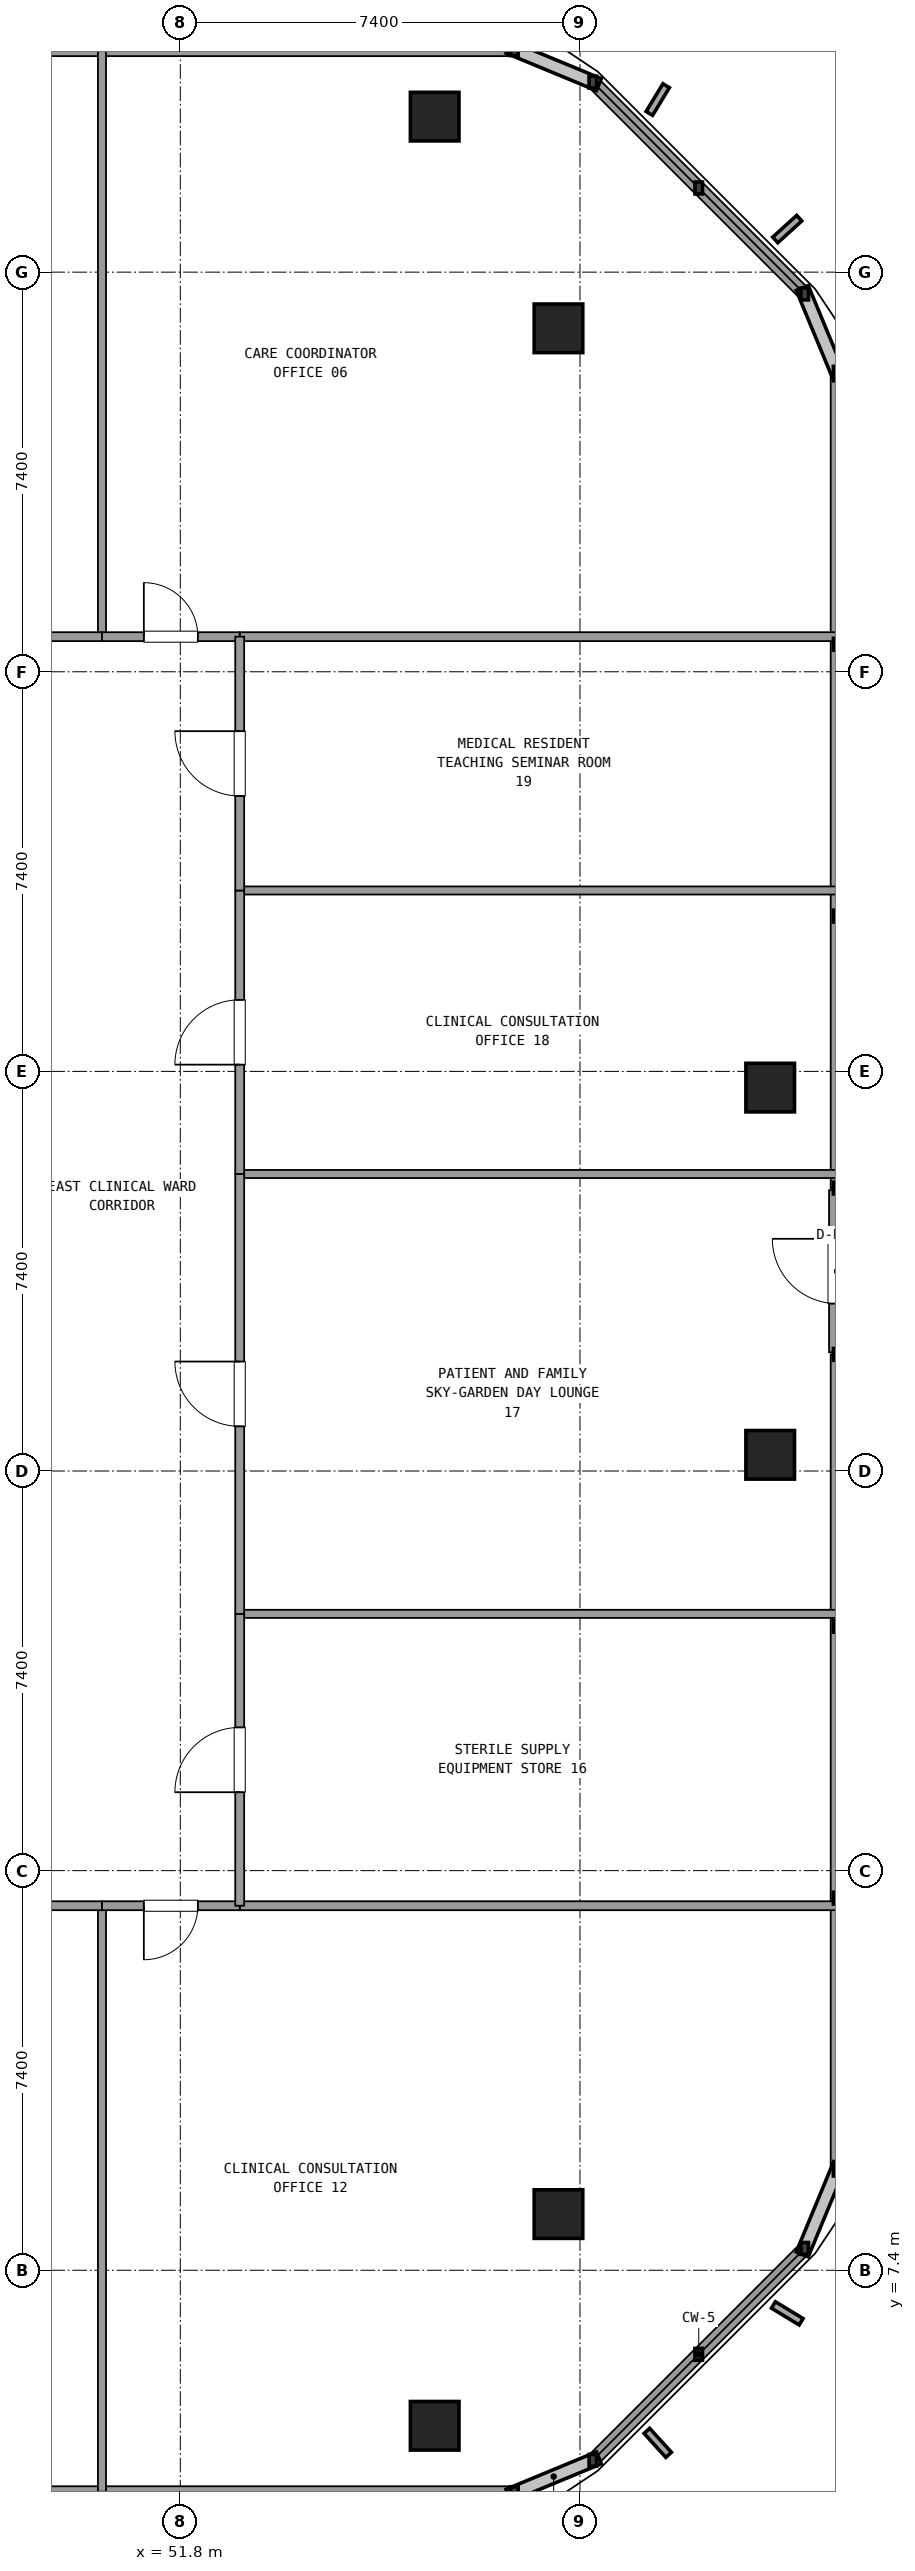
"""IFC4 building model, lengths in metres.
Left out: names, types, materials, properties, quantities, classifications, styles, units other than length and angle.
Written with IfcOpenShell. Run it as: python <this file> out.ifc"""

import sys

from ifc_helpers import new_model, si_unit, direction, frame, frame_2d, origin, origin_2d, place, context, subcontext, project, spatial, rectangle, extrude, element, fill, save


model = new_model("IFC4")
c1 = context("Model", 3, precision=1e-05, world=origin(), true_north=direction((0.0, 1.0)))
c2 = subcontext(c1, "Body", "Model", "MODEL_VIEW")
j1 = project(units=[si_unit("LENGTHUNIT", "METRE"), si_unit("PLANEANGLEUNIT", "RADIAN")], contexts=[c1])
p1 = place(None, origin())
s1 = spatial("IfcSite", under=j1, at=p1, CompositionType="ELEMENT")
p2 = place(p1, origin())
s2 = spatial("IfcBuilding", under=s1, at=p2, CompositionType="ELEMENT")
p3 = place(p2, frame((0.0, 0.0, 221.58)))
s3 = spatial("IfcBuildingStorey", under=s2, at=p3, CompositionType="ELEMENT", Elevation=221.58)
for number, where, z_axis, x_axis in (
    (1, (56.51, 4.52, 0.021), (0.0, 0.0, 1.0), (1.0, 0.0, 0.0)),
    (2, (58.802, 8.44, 0.021), (0.0, 0.0, 1.0), (1.0, 0.0, 0.0)),
    (3, (62.722, 22.5, 0.021), (0.0, 0.0, 1.0), (1.0, 0.0, 0.0)),
    (4, (62.722, 29.3, 0.021), (0.0, 0.0, 1.0), (1.0, 0.0, 0.0)),
    (5, (58.802, 43.36, 0.021), (0.0, 0.0, 1.0), (1.0, 0.0, 0.0)),
    (6, (56.51, 47.28, 0.021), (0.0, 0.0, 1.0), (1.0, 0.0, 0.0)),
):
    element("IfcColumn", number, at=place(p3, frame(where, z_axis=z_axis, x_axis=x_axis)), inside=s3, PredefinedType="COLUMN", context=c2, shape_type="SweptSolid", body=[
        extrude(rectangle(XDim=0.9, YDim=0.9, at=origin_2d()), origin(), (0.0, 0.0, 1.0), 3.579),
    ])
p4 = place(p3, frame((16.013, 3.28, 0.0), z_axis=(0.0, 0.0, 1.0), x_axis=(1.0, 0.0, 0.0)))
e7 = element("IfcWall", 7, at=p4, inside=s3, PredefinedType="SOLIDWALL", context=c2, shape_type="SweptSolid", body=[
    extrude(rectangle(XDim=41.974, YDim=0.24, at=frame_2d((20.987, 0.0))), origin(), (0.0, 0.0, 1.0), 0.85),
])
p5 = place(p3, frame((59.438, 3.881, 0.0), z_axis=(0.0, 0.0, 1.0), x_axis=(0.707128783731, 0.707084777957, 0.0)))
e8 = element("IfcWall", 8, at=p5, inside=s3, PredefinedType="SOLIDWALL", context=c2, shape_type="SweptSolid", body=[
    extrude(rectangle(XDim=5.548, YDim=0.24, at=frame_2d((2.774, 0.0))), origin(), (0.0, 0.0, 1.0), 0.85),
])
p6 = place(p3, frame((63.962, 24.4, 0.0), z_axis=(0.0, 0.0, 1.0), x_axis=(0.0, 1.0, 0.0)))
e9 = element("IfcWall", 9, at=p6, inside=s3, PredefinedType="SOLIDWALL", context=c2, shape_type="SweptSolid", body=[
    extrude(rectangle(XDim=3.0, YDim=0.3, at=frame_2d((1.5, 0.0))), origin(), (0.0, 0.0, 1.0), 2.69),
])
p7 = place(p6, frame((0.9, 0.0, 0.0)))
e10 = element("IfcOpeningElement", 10, at=p7, cuts=e9, PredefinedType="OPENING", context=c2, shape_type="SweptSolid", body=[
    extrude(rectangle(XDim=1.2, YDim=2.2, at=frame_2d((0.6, 1.1))), frame((0.0, 0.16, 0.0), z_axis=(0.0, -1.0, 0.0), x_axis=(1.0, 0.0, 0.0)), (0.0, 0.0, 1.0), 0.32),
])
p8 = place(p3, frame((63.962, 9.255, 0.0), z_axis=(0.0, 0.0, 1.0), x_axis=(0.0, 1.0, 0.0)))
e11 = element("IfcWall", 11, at=p8, inside=s3, PredefinedType="SOLIDWALL", context=c2, shape_type="SweptSolid", body=[
    extrude(rectangle(XDim=15.105, YDim=0.24, at=frame_2d((7.553, 0.0))), origin(), (0.0, 0.0, 1.0), 0.85),
])
p9 = place(p3, frame((63.962, 27.44, 0.0), z_axis=(0.0, 0.0, 1.0), x_axis=(0.0, 1.0, 0.0)))
e12 = element("IfcWall", 12, at=p9, inside=s3, PredefinedType="SOLIDWALL", context=c2, shape_type="SweptSolid", body=[
    extrude(rectangle(XDim=15.105, YDim=0.24, at=frame_2d((7.552, 0.0))), origin(), (0.0, 0.0, 1.0), 0.85),
])
p10 = place(p3, frame((63.361, 43.996, 0.0), z_axis=(0.0, 0.0, 1.0), x_axis=(-0.707128783731, 0.707084777957, 0.0)))
e13 = element("IfcWall", 13, at=p10, inside=s3, PredefinedType="SOLIDWALL", context=c2, shape_type="SweptSolid", body=[
    extrude(rectangle(XDim=5.548, YDim=0.24, at=frame_2d((2.774, 0.0))), origin(), (0.0, 0.0, 1.0), 0.85),
])
p11 = place(p3, frame((57.987, 48.52, 0.0), z_axis=(0.0, 0.0, 1.0), x_axis=(-1.0, 0.0, 0.0)))
e14 = element("IfcWall", 14, at=p11, inside=s3, PredefinedType="SOLIDWALL", context=c2, shape_type="SweptSolid", body=[
    extrude(rectangle(XDim=41.974, YDim=0.24, at=frame_2d((20.987, 0.0))), origin(), (0.0, 0.0, 1.0), 0.85),
])
for number, where, z_axis, x_axis in (
    (15, (52.9, 37.65, 0.0), (0.0, 0.0, 1.0), (1.0, 0.0, 0.0)),
    (16, (52.9, 14.15, 0.0), (0.0, 0.0, 1.0), (1.0, 0.0, 0.0)),
):
    element("IfcWall", number, at=place(p3, frame(where, z_axis=z_axis, x_axis=x_axis)), inside=s3, PredefinedType="PARTITIONING", context=c2, shape_type="SweptSolid", body=[
        extrude(rectangle(XDim=11.042, YDim=0.165, at=frame_2d((5.521, 0.0))), origin(), (0.0, 0.0, 1.0), 2.61),
    ])
p12 = place(p3, frame((50.35, 37.65, 0.0), z_axis=(0.0, 0.0, 1.0), x_axis=(0.0, 1.0, 0.0)))
e17 = element("IfcWall", 17, at=p12, inside=s3, PredefinedType="PARTITIONING", context=c2, shape_type="SweptSolid", body=[
    extrude(rectangle(XDim=10.85, YDim=0.15, at=frame_2d((5.425, 0.0))), origin(), (0.0, 0.0, 1.0), 2.61),
])
p13 = place(p3, frame((43.221, 37.65, 0.0), z_axis=(0.0, 0.0, 1.0), x_axis=(1.0, 0.0, 0.0)))
e18 = element("IfcWall", 18, at=p13, inside=s3, PredefinedType="PARTITIONING", context=c2, shape_type="SweptSolid", body=[
    extrude(rectangle(XDim=7.129, YDim=0.165, at=frame_2d((3.564, 0.0))), origin(), (0.0, 0.0, 1.0), 2.61),
])
p14 = place(p13, frame((2.965, 0.0, 0.0)))
e19 = element("IfcOpeningElement", 19, at=p14, cuts=e18, PredefinedType="OPENING", context=c2, shape_type="SweptSolid", body=[
    extrude(rectangle(XDim=1.2, YDim=2.15, at=frame_2d((0.6, 1.075))), frame((0.0, 0.093, 0.0), z_axis=(0.0, -1.0, 0.0), x_axis=(1.0, 0.0, 0.0)), (0.0, 0.0, 1.0), 0.185),
])
p15 = place(p3, frame((50.35, 37.65, 0.0), z_axis=(0.0, 0.0, 1.0), x_axis=(1.0, 0.0, 0.0)))
e20 = element("IfcWall", 20, at=p15, inside=s3, PredefinedType="PARTITIONING", context=c2, shape_type="SweptSolid", body=[
    extrude(rectangle(XDim=2.55, YDim=0.165, at=frame_2d((1.275, 0.0))), origin(), (0.0, 0.0, 1.0), 2.61),
])
p16 = place(p15, frame((0.775, 0.0, 0.0)))
e21 = element("IfcOpeningElement", 21, at=p16, cuts=e20, PredefinedType="OPENING", context=c2, shape_type="SweptSolid", body=[
    extrude(rectangle(XDim=1.0, YDim=2.15, at=frame_2d((0.5, 1.075))), frame((0.0, 0.093, 0.0), z_axis=(0.0, -1.0, 0.0), x_axis=(1.0, 0.0, 0.0)), (0.0, 0.0, 1.0), 0.185),
])
p17 = place(p3, frame((50.35, 14.15, 0.0), z_axis=(0.0, 0.0, 1.0), x_axis=(0.0, -1.0, 0.0)))
e22 = element("IfcWall", 22, at=p17, inside=s3, PredefinedType="PARTITIONING", context=c2, shape_type="SweptSolid", body=[
    extrude(rectangle(XDim=10.85, YDim=0.15, at=frame_2d((5.425, 0.0))), origin(), (0.0, 0.0, 1.0), 2.61),
])
p18 = place(p3, frame((43.221, 14.15, 0.0), z_axis=(0.0, 0.0, 1.0), x_axis=(1.0, 0.0, 0.0)))
e23 = element("IfcWall", 23, at=p18, inside=s3, PredefinedType="PARTITIONING", context=c2, shape_type="SweptSolid", body=[
    extrude(rectangle(XDim=7.129, YDim=0.165, at=frame_2d((3.564, 0.0))), origin(), (0.0, 0.0, 1.0), 2.61),
])
p19 = place(p18, frame((2.965, 0.0, 0.0)))
e24 = element("IfcOpeningElement", 24, at=p19, cuts=e23, PredefinedType="OPENING", context=c2, shape_type="SweptSolid", body=[
    extrude(rectangle(XDim=1.2, YDim=2.15, at=frame_2d((0.6, 1.075))), frame((0.0, 0.093, 0.0), z_axis=(0.0, -1.0, 0.0), x_axis=(1.0, 0.0, 0.0)), (0.0, 0.0, 1.0), 0.185),
])
p20 = place(p3, frame((50.35, 14.15, 0.0), z_axis=(0.0, 0.0, 1.0), x_axis=(1.0, 0.0, 0.0)))
e25 = element("IfcWall", 25, at=p20, inside=s3, PredefinedType="PARTITIONING", context=c2, shape_type="SweptSolid", body=[
    extrude(rectangle(XDim=2.55, YDim=0.165, at=frame_2d((1.275, 0.0))), origin(), (0.0, 0.0, 1.0), 2.61),
])
p21 = place(p20, frame((0.775, 0.0, 0.0)))
e26 = element("IfcOpeningElement", 26, at=p21, cuts=e25, PredefinedType="OPENING", context=c2, shape_type="SweptSolid", body=[
    extrude(rectangle(XDim=1.0, YDim=2.15, at=frame_2d((0.5, 1.075))), frame((0.0, 0.093, 0.0), z_axis=(0.0, -1.0, 0.0), x_axis=(1.0, 0.0, 0.0)), (0.0, 0.0, 1.0), 0.185),
])
p22 = place(p3, frame((52.9, 19.555, 0.0), z_axis=(0.0, 0.0, 1.0), x_axis=(1.0, 0.0, 0.0)))
e27 = element("IfcWall", 27, at=p22, inside=s3, PredefinedType="PARTITIONING", context=c2, shape_type="SweptSolid", body=[
    extrude(rectangle(XDim=11.042, YDim=0.15, at=frame_2d((5.521, 0.0))), origin(), (0.0, 0.0, 1.0), 2.61),
])
p23 = place(p3, frame((52.9, 14.15, 0.0), z_axis=(0.0, 0.0, 1.0), x_axis=(0.0, 1.0, 0.0)))
e28 = element("IfcWall", 28, at=p23, inside=s3, PredefinedType="PARTITIONING", context=c2, shape_type="SweptSolid", body=[
    extrude(rectangle(XDim=5.405, YDim=0.165, at=frame_2d((2.703, 0.0))), origin(), (0.0, 0.0, 1.0), 2.61),
])
p24 = place(p23, frame((2.102, 0.0, 0.0)))
e29 = element("IfcOpeningElement", 29, at=p24, cuts=e28, PredefinedType="OPENING", context=c2, shape_type="SweptSolid", body=[
    extrude(rectangle(XDim=1.2, YDim=2.15, at=frame_2d((0.6, 1.075))), frame((0.0, 0.093, 0.0), z_axis=(0.0, -1.0, 0.0), x_axis=(1.0, 0.0, 0.0)), (0.0, 0.0, 1.0), 0.185),
])
p25 = place(p3, frame((52.9, 27.7, 0.0), z_axis=(0.0, 0.0, 1.0), x_axis=(1.0, 0.0, 0.0)))
e30 = element("IfcWall", 30, at=p25, inside=s3, PredefinedType="PARTITIONING", context=c2, shape_type="SweptSolid", body=[
    extrude(rectangle(XDim=11.042, YDim=0.15, at=frame_2d((5.521, 0.0))), origin(), (0.0, 0.0, 1.0), 2.61),
])
p26 = place(p3, frame((52.9, 19.555, 0.0), z_axis=(0.0, 0.0, 1.0), x_axis=(0.0, 1.0, 0.0)))
e31 = element("IfcWall", 31, at=p26, inside=s3, PredefinedType="PARTITIONING", context=c2, shape_type="SweptSolid", body=[
    extrude(rectangle(XDim=8.145, YDim=0.165, at=frame_2d((4.073, 0.0))), origin(), (0.0, 0.0, 1.0), 2.61),
])
p27 = place(p26, frame((3.472, 0.0, 0.0)))
e32 = element("IfcOpeningElement", 32, at=p27, cuts=e31, PredefinedType="OPENING", context=c2, shape_type="SweptSolid", body=[
    extrude(rectangle(XDim=1.2, YDim=2.15, at=frame_2d((0.6, 1.075))), frame((0.0, 0.093, 0.0), z_axis=(0.0, -1.0, 0.0), x_axis=(1.0, 0.0, 0.0)), (0.0, 0.0, 1.0), 0.185),
])
p28 = place(p3, frame((52.9, 32.95, 0.0), z_axis=(0.0, 0.0, 1.0), x_axis=(1.0, 0.0, 0.0)))
e33 = element("IfcWall", 33, at=p28, inside=s3, PredefinedType="PARTITIONING", context=c2, shape_type="SweptSolid", body=[
    extrude(rectangle(XDim=11.042, YDim=0.15, at=frame_2d((5.521, 0.0))), origin(), (0.0, 0.0, 1.0), 2.61),
])
p29 = place(p3, frame((52.9, 27.7, 0.0), z_axis=(0.0, 0.0, 1.0), x_axis=(0.0, 1.0, 0.0)))
e34 = element("IfcWall", 34, at=p29, inside=s3, PredefinedType="PARTITIONING", context=c2, shape_type="SweptSolid", body=[
    extrude(rectangle(XDim=5.25, YDim=0.165, at=frame_2d((2.625, 0.0))), origin(), (0.0, 0.0, 1.0), 2.61),
])
p30 = place(p29, frame((2.025, 0.0, 0.0)))
e35 = element("IfcOpeningElement", 35, at=p30, cuts=e34, PredefinedType="OPENING", context=c2, shape_type="SweptSolid", body=[
    extrude(rectangle(XDim=1.2, YDim=2.15, at=frame_2d((0.6, 1.075))), frame((0.0, 0.093, 0.0), z_axis=(0.0, -1.0, 0.0), x_axis=(1.0, 0.0, 0.0)), (0.0, 0.0, 1.0), 0.185),
])
p31 = place(p3, frame((52.9, 32.95, 0.0), z_axis=(0.0, 0.0, 1.0), x_axis=(0.0, 1.0, 0.0)))
e36 = element("IfcWall", 36, at=p31, inside=s3, PredefinedType="PARTITIONING", context=c2, shape_type="SweptSolid", body=[
    extrude(rectangle(XDim=4.7, YDim=0.165, at=frame_2d((2.35, 0.0))), origin(), (0.0, 0.0, 1.0), 2.61),
])
p32 = place(p31, frame((1.75, 0.0, 0.0)))
e37 = element("IfcOpeningElement", 37, at=p32, cuts=e36, PredefinedType="OPENING", context=c2, shape_type="SweptSolid", body=[
    extrude(rectangle(XDim=1.2, YDim=2.15, at=frame_2d((0.6, 1.075))), frame((0.0, 0.093, 0.0), z_axis=(0.0, -1.0, 0.0), x_axis=(1.0, 0.0, 0.0)), (0.0, 0.0, 1.0), 0.185),
])
p33 = place(p16, origin())
e38 = element("IfcDoor", 38, at=p33, inside=s3, OperationType="SINGLE_SWING_LEFT", PredefinedType="DOOR", context=c2, shape_type="SweptSolid", body=[
    extrude(rectangle(XDim=1.0, YDim=2.15, at=frame_2d((0.5, 1.075))), frame((0.0, 0.025, 0.0), z_axis=(0.0, -1.0, 0.0), x_axis=(1.0, 0.0, 0.0)), (0.0, 0.0, 1.0), 0.05),
])
fill(e21, e38)
p34 = place(p21, frame((1.0, 0.0, 0.0), z_axis=(0.0, 0.0, 1.0), x_axis=(-1.0, 0.0, 0.0)))
e39 = element("IfcDoor", 39, at=p34, inside=s3, OperationType="SINGLE_SWING_LEFT", PredefinedType="DOOR", context=c2, shape_type="SweptSolid", body=[
    extrude(rectangle(XDim=1.0, YDim=2.15, at=frame_2d((0.5, 1.075))), frame((0.0, 0.025, 0.0), z_axis=(0.0, -1.0, 0.0), x_axis=(1.0, 0.0, 0.0)), (0.0, 0.0, 1.0), 0.05),
])
fill(e26, e39)
p35 = place(p24, origin())
e40 = element("IfcDoor", 40, at=p35, inside=s3, OperationType="SINGLE_SWING_LEFT", PredefinedType="DOOR", context=c2, shape_type="SweptSolid", body=[
    extrude(rectangle(XDim=1.2, YDim=2.15, at=frame_2d((0.6, 1.075))), frame((0.0, 0.025, 0.0), z_axis=(0.0, -1.0, 0.0), x_axis=(1.0, 0.0, 0.0)), (0.0, 0.0, 1.0), 0.05),
])
fill(e29, e40)
p36 = place(p27, origin())
e41 = element("IfcDoor", 41, at=p36, inside=s3, OperationType="SINGLE_SWING_RIGHT", PredefinedType="DOOR", context=c2, shape_type="SweptSolid", body=[
    extrude(rectangle(XDim=1.2, YDim=2.15, at=frame_2d((0.6, 1.075))), frame((0.0, 0.025, 0.0), z_axis=(0.0, -1.0, 0.0), x_axis=(1.0, 0.0, 0.0)), (0.0, 0.0, 1.0), 0.05),
])
fill(e32, e41)
p37 = place(p30, origin())
e42 = element("IfcDoor", 42, at=p37, inside=s3, OperationType="SINGLE_SWING_LEFT", PredefinedType="DOOR", context=c2, shape_type="SweptSolid", body=[
    extrude(rectangle(XDim=1.2, YDim=2.15, at=frame_2d((0.6, 1.075))), frame((0.0, 0.025, 0.0), z_axis=(0.0, -1.0, 0.0), x_axis=(1.0, 0.0, 0.0)), (0.0, 0.0, 1.0), 0.05),
])
fill(e35, e42)
p38 = place(p32, origin())
e43 = element("IfcDoor", 43, at=p38, inside=s3, OperationType="SINGLE_SWING_RIGHT", PredefinedType="DOOR", context=c2, shape_type="SweptSolid", body=[
    extrude(rectangle(XDim=1.2, YDim=2.15, at=frame_2d((0.6, 1.075))), frame((0.0, 0.025, 0.0), z_axis=(0.0, -1.0, 0.0), x_axis=(1.0, 0.0, 0.0)), (0.0, 0.0, 1.0), 0.05),
])
fill(e37, e43)
save(model, sys.argv[1])
